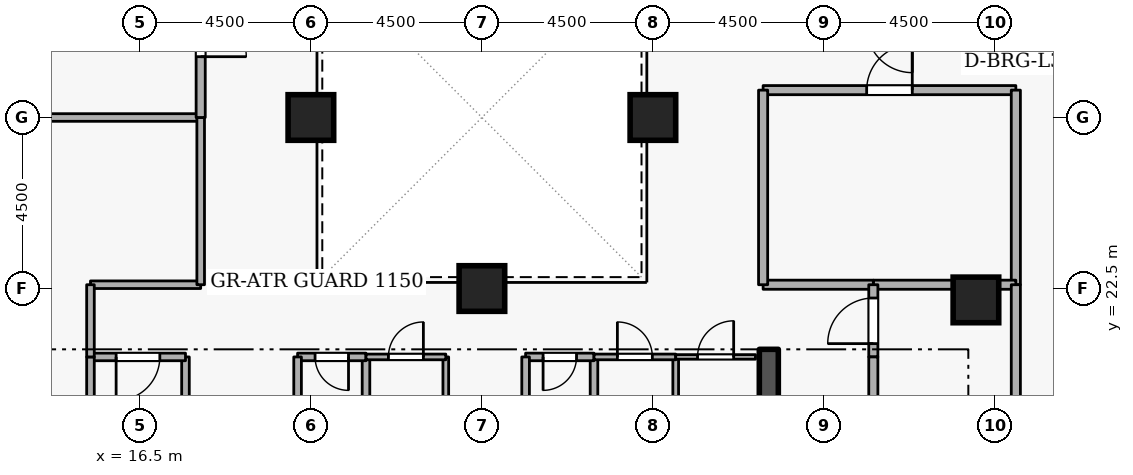
"""IFC4 building model, lengths in metres.
Left out: names, types, materials, properties, quantities, classifications, styles, units other than length and angle.
Written with IfcOpenShell. Run it as: python <this file> out.ifc"""

import sys

from ifc_helpers import new_model, si_unit, direction, frame, frame_2d, origin, origin_2d, place, context, subcontext, project, spatial, rectangle, extrude, element, fill, save


model = new_model("IFC4")
c1 = context("Model", 3, precision=1e-05, world=origin(), true_north=direction((0.0, 1.0)))
c2 = subcontext(c1, "Body", "Model", "MODEL_VIEW")
j1 = project(units=[si_unit("LENGTHUNIT", "METRE"), si_unit("PLANEANGLEUNIT", "RADIAN")], contexts=[c1])
p1 = place(None, origin())
s1 = spatial("IfcSite", under=j1, at=p1, CompositionType="ELEMENT")
p2 = place(p1, origin())
s2 = spatial("IfcBuilding", under=s1, at=p2, CompositionType="ELEMENT")
p3 = place(p2, frame((0.0, 0.0, 141.3)))
s3 = spatial("IfcBuildingStorey", under=s2, at=p3, CompositionType="ELEMENT", Elevation=141.3)
p4 = place(p3, frame((33.05, 15.1, 0.0), z_axis=(0.0, 0.0, 1.0), x_axis=(0.0, 1.0, 0.0)))
e1 = element("IfcWall", 1, at=p4, inside=s3, PredefinedType="SHEAR", context=c2, shape_type="SweptSolid", body=[
    extrude(rectangle(XDim=5.8, YDim=0.5, at=frame_2d((2.9, 0.0))), origin(), (0.0, 0.0, 1.0), 4.2),
])
for number, where, z_axis, x_axis in (
    (2, (38.5, 22.2, 0.0), (0.0, 0.0, 1.0), (1.0, 0.0, 0.0)),
    (3, (25.5, 22.5, 0.0), (0.0, 0.0, 1.0), (1.0, 0.0, 0.0)),
    (4, (21.0, 27.0, 0.0), (0.0, 0.0, 1.0), (1.0, 0.0, 0.0)),
    (5, (30.0, 27.0, 0.0), (0.0, 0.0, 1.0), (1.0, 0.0, 0.0)),
):
    element("IfcColumn", number, at=place(p3, frame(where, z_axis=z_axis, x_axis=x_axis)), inside=s3, PredefinedType="COLUMN", context=c2, shape_type="SweptSolid", body=[
        extrude(rectangle(XDim=1.2, YDim=1.2, at=origin_2d()), origin(), (0.0, 0.0, 1.0), 4.2),
    ])
p5 = place(p3, frame((17.7, 18.4, 0.0), z_axis=(0.0, 0.0, 1.0), x_axis=(0.0, 1.0, 0.0)))
e6 = element("IfcWall", 6, at=p5, inside=s3, PredefinedType="STANDARD", context=c2, shape_type="SweptSolid", body=[
    extrude(rectangle(XDim=2.3, YDim=0.2, at=frame_2d((1.15, 0.0))), origin(), (0.0, 0.0, 1.0), 3.145),
])
p6 = place(p3, frame((17.7, 20.7, 0.0), z_axis=(0.0, 0.0, 1.0), x_axis=(-1.0, 0.0, 0.0)))
e7 = element("IfcWall", 7, at=p6, inside=s3, PredefinedType="STANDARD", context=c2, shape_type="SweptSolid", body=[
    extrude(rectangle(XDim=2.5, YDim=0.2, at=frame_2d((1.25, 0.0))), origin(), (0.0, 0.0, 1.0), 3.94),
])
p7 = place(p6, frame((0.675, 0.0, 0.0)))
e8 = element("IfcOpeningElement", 8, at=p7, cuts=e7, PredefinedType="OPENING", context=c2, shape_type="SweptSolid", body=[
    extrude(rectangle(XDim=1.15, YDim=2.1, at=frame_2d((0.575, 1.05))), frame((0.0, 0.11, 0.0), z_axis=(0.0, -1.0, 0.0), x_axis=(1.0, 0.0, 0.0)), (0.0, 0.0, 1.0), 0.22),
])
p8 = place(p3, frame((15.2, 20.7, 0.0), z_axis=(0.0, 0.0, 1.0), x_axis=(0.0, -1.0, 0.0)))
e9 = element("IfcWall", 9, at=p8, inside=s3, PredefinedType="STANDARD", context=c2, shape_type="SweptSolid", body=[
    extrude(rectangle(XDim=5.7, YDim=0.2, at=frame_2d((2.85, 0.0))), origin(), (0.0, 0.0, 1.0), 3.94),
])
p9 = place(p8, frame((2.275, 0.0, 0.0)))
e10 = element("IfcOpeningElement", 10, at=p9, cuts=e9, PredefinedType="OPENING", context=c2, shape_type="SweptSolid", body=[
    extrude(rectangle(XDim=1.15, YDim=2.1, at=frame_2d((0.575, 1.05))), frame((0.0, 0.11, 0.0), z_axis=(0.0, -1.0, 0.0), x_axis=(1.0, 0.0, 0.0)), (0.0, 0.0, 1.0), 0.22),
])
p10 = place(p3, frame((28.45, 18.65, 0.0), z_axis=(0.0, 0.0, 1.0), x_axis=(0.0, 1.0, 0.0)))
e11 = element("IfcWall", 11, at=p10, inside=s3, PredefinedType="STANDARD", context=c2, shape_type="SweptSolid", body=[
    extrude(rectangle(XDim=2.05, YDim=0.2, at=frame_2d((1.025, 0.0))), origin(), (0.0, 0.0, 1.0), 3.94),
])
p11 = place(p3, frame((28.45, 20.7, 0.0), z_axis=(0.0, 0.0, 1.0), x_axis=(-1.0, 0.0, 0.0)))
e12 = element("IfcWall", 12, at=p11, inside=s3, PredefinedType="STANDARD", context=c2, shape_type="SweptSolid", body=[
    extrude(rectangle(XDim=1.8, YDim=0.2, at=frame_2d((0.9, 0.0))), origin(), (0.0, 0.0, 1.0), 3.94),
])
p12 = place(p11, frame((0.46, 0.0, 0.0)))
e13 = element("IfcOpeningElement", 13, at=p12, cuts=e12, PredefinedType="OPENING", context=c2, shape_type="SweptSolid", body=[
    extrude(rectangle(XDim=0.88, YDim=2.04, at=frame_2d((0.44, 1.02))), frame((0.0, 0.11, 0.0), z_axis=(0.0, -1.0, 0.0), x_axis=(1.0, 0.0, 0.0)), (0.0, 0.0, 1.0), 0.22),
])
for number, where, z_axis, x_axis in (
    (14, (26.65, 20.7, 0.0), (0.0, 0.0, 1.0), (0.0, -1.0, 0.0)),
    (15, (22.45, 18.65, 0.0), (0.0, 0.0, 1.0), (0.0, 1.0, 0.0)),
):
    element("IfcWall", number, at=place(p3, frame(where, z_axis=z_axis, x_axis=x_axis)), inside=s3, PredefinedType="STANDARD", context=c2, shape_type="SweptSolid", body=[
        extrude(rectangle(XDim=2.05, YDim=0.2, at=frame_2d((1.025, 0.0))), origin(), (0.0, 0.0, 1.0), 3.94),
    ])
p13 = place(p3, frame((22.45, 20.7, 0.0), z_axis=(0.0, 0.0, 1.0), x_axis=(-1.0, 0.0, 0.0)))
e16 = element("IfcWall", 16, at=p13, inside=s3, PredefinedType="STANDARD", context=c2, shape_type="SweptSolid", body=[
    extrude(rectangle(XDim=1.8, YDim=0.2, at=frame_2d((0.9, 0.0))), origin(), (0.0, 0.0, 1.0), 3.94),
])
p14 = place(p13, frame((0.46, 0.0, 0.0)))
e17 = element("IfcOpeningElement", 17, at=p14, cuts=e16, PredefinedType="OPENING", context=c2, shape_type="SweptSolid", body=[
    extrude(rectangle(XDim=0.88, YDim=2.04, at=frame_2d((0.44, 1.02))), frame((0.0, 0.11, 0.0), z_axis=(0.0, -1.0, 0.0), x_axis=(1.0, 0.0, 0.0)), (0.0, 0.0, 1.0), 0.22),
])
p15 = place(p3, frame((20.65, 20.7, 0.0), z_axis=(0.0, 0.0, 1.0), x_axis=(0.0, -1.0, 0.0)))
e18 = element("IfcWall", 18, at=p15, inside=s3, PredefinedType="STANDARD", context=c2, shape_type="SweptSolid", body=[
    extrude(rectangle(XDim=2.05, YDim=0.2, at=frame_2d((1.025, 0.0))), origin(), (0.0, 0.0, 1.0), 3.94),
])
p16 = place(p3, frame((32.9, 27.72, 0.0), z_axis=(0.0, 0.0, 1.0), x_axis=(1.0, 0.0, 0.0)))
e19 = element("IfcWall", 19, at=p16, inside=s3, PredefinedType="STANDARD", context=c2, shape_type="SweptSolid", body=[
    extrude(rectangle(XDim=6.65, YDim=0.24, at=frame_2d((3.325, 0.0))), origin(), (0.0, 0.0, 1.0), 3.94),
])
p17 = place(p16, frame((2.725, 0.0, 0.0)))
e20 = element("IfcOpeningElement", 20, at=p17, cuts=e19, PredefinedType="OPENING", context=c2, shape_type="SweptSolid", body=[
    extrude(rectangle(XDim=1.2, YDim=2.1, at=frame_2d((0.6, 1.05))), frame((0.0, 0.13, 0.0), z_axis=(0.0, -1.0, 0.0), x_axis=(1.0, 0.0, 0.0)), (0.0, 0.0, 1.0), 0.26),
])
p18 = place(p3, frame((39.55, 27.72, 0.0), z_axis=(0.0, 0.0, 1.0), x_axis=(0.0, -1.0, 0.0)))
e21 = element("IfcWall", 21, at=p18, inside=s3, PredefinedType="STANDARD", context=c2, shape_type="SweptSolid", body=[
    extrude(rectangle(XDim=5.12, YDim=0.24, at=frame_2d((2.56, 0.0))), origin(), (0.0, 0.0, 1.0), 3.94),
])
p19 = place(p3, frame((39.55, 22.6, 0.0), z_axis=(0.0, 0.0, 1.0), x_axis=(-1.0, 0.0, 0.0)))
e22 = element("IfcWall", 22, at=p19, inside=s3, PredefinedType="STANDARD", context=c2, shape_type="SweptSolid", body=[
    extrude(rectangle(XDim=3.75, YDim=0.24, at=frame_2d((1.875, 0.0))), origin(), (0.0, 0.0, 1.0), 3.94),
])
p20 = place(p3, frame((35.8, 22.6, 0.0), z_axis=(0.0, 0.0, 1.0), x_axis=(-1.0, 0.0, 0.0)))
e23 = element("IfcWall", 23, at=p20, inside=s3, PredefinedType="STANDARD", context=c2, shape_type="SweptSolid", body=[
    extrude(rectangle(XDim=2.9, YDim=0.24, at=frame_2d((1.45, 0.0))), origin(), (0.0, 0.0, 1.0), 3.94),
])
p21 = place(p3, frame((32.9, 22.6, 0.0), z_axis=(0.0, 0.0, 1.0), x_axis=(0.0, 1.0, 0.0)))
e24 = element("IfcWall", 24, at=p21, inside=s3, PredefinedType="STANDARD", context=c2, shape_type="SweptSolid", body=[
    extrude(rectangle(XDim=5.12, YDim=0.24, at=frame_2d((2.56, 0.0))), origin(), (0.0, 0.0, 1.0), 3.145),
])
p22 = place(p3, frame((18.1, 22.6, 0.0), z_axis=(0.0, 0.0, 1.0), x_axis=(-1.0, 0.0, 0.0)))
e25 = element("IfcWall", 25, at=p22, inside=s3, PredefinedType="STANDARD", context=c2, shape_type="SweptSolid", body=[
    extrude(rectangle(XDim=2.9, YDim=0.2, at=frame_2d((1.45, 0.0))), origin(), (0.0, 0.0, 1.0), 3.94),
])
p23 = place(p3, frame((15.2, 22.6, 0.0), z_axis=(0.0, 0.0, 1.0), x_axis=(0.0, -1.0, 0.0)))
e26 = element("IfcWall", 26, at=p23, inside=s3, PredefinedType="STANDARD", context=c2, shape_type="SweptSolid", body=[
    extrude(rectangle(XDim=1.9, YDim=0.2, at=frame_2d((0.95, 0.0))), origin(), (0.0, 0.0, 1.0), 3.94),
])
p24 = place(p3, frame((5.45, 27.0, 0.0), z_axis=(0.0, 0.0, 1.0), x_axis=(1.0, 0.0, 0.0)))
e27 = element("IfcWall", 27, at=p24, inside=s3, PredefinedType="STANDARD", context=c2, shape_type="SweptSolid", body=[
    extrude(rectangle(XDim=12.65, YDim=0.2, at=frame_2d((6.325, 0.0))), origin(), (0.0, 0.0, 1.0), 3.325),
])
p25 = place(p3, frame((18.1, 27.0, 0.0), z_axis=(0.0, 0.0, 1.0), x_axis=(0.0, -1.0, 0.0)))
e28 = element("IfcWall", 28, at=p25, inside=s3, PredefinedType="STANDARD", context=c2, shape_type="SweptSolid", body=[
    extrude(rectangle(XDim=4.4, YDim=0.2, at=frame_2d((2.2, 0.0))), origin(), (0.0, 0.0, 1.0), 3.145),
])
p26 = place(p3, frame((18.1, 31.4, 0.0), z_axis=(0.0, 0.0, 1.0), x_axis=(0.0, -1.0, 0.0)))
e29 = element("IfcWall", 29, at=p26, inside=s3, PredefinedType="STANDARD", context=c2, shape_type="SweptSolid", body=[
    extrude(rectangle(XDim=4.4, YDim=0.24, at=frame_2d((2.2, 0.0))), origin(), (0.0, 0.0, 1.0), 3.145),
])
p27 = place(p26, frame((1.6, 0.0, 0.0)))
e30 = element("IfcOpeningElement", 30, at=p27, cuts=e29, PredefinedType="OPENING", context=c2, shape_type="SweptSolid", body=[
    extrude(rectangle(XDim=1.2, YDim=2.1, at=frame_2d((0.6, 1.05))), frame((0.0, 0.13, 0.0), z_axis=(0.0, -1.0, 0.0), x_axis=(1.0, 0.0, 0.0)), (0.0, 0.0, 1.0), 0.26),
])
p28 = place(p3, frame((35.8, 20.7, 0.0), z_axis=(0.0, 0.0, 1.0), x_axis=(0.0, 1.0, 0.0)))
e31 = element("IfcWall", 31, at=p28, inside=s3, PredefinedType="STANDARD", context=c2, shape_type="SweptSolid", body=[
    extrude(rectangle(XDim=1.9, YDim=0.24, at=frame_2d((0.95, 0.0))), origin(), (0.0, 0.0, 1.0), 3.94),
])
p29 = place(p28, frame((0.35, 0.0, 0.0)))
e32 = element("IfcOpeningElement", 32, at=p29, cuts=e31, PredefinedType="OPENING", context=c2, shape_type="SweptSolid", body=[
    extrude(rectangle(XDim=1.2, YDim=2.1, at=frame_2d((0.6, 1.05))), frame((0.0, 0.13, 0.0), z_axis=(0.0, -1.0, 0.0), x_axis=(1.0, 0.0, 0.0)), (0.0, 0.0, 1.0), 0.26),
])
p30 = place(p3, frame((39.55, 22.6, 0.0), z_axis=(0.0, 0.0, 1.0), x_axis=(0.0, -1.0, 0.0)))
e33 = element("IfcWall", 33, at=p30, inside=s3, PredefinedType="STANDARD", context=c2, shape_type="SweptSolid", body=[
    extrude(rectangle(XDim=7.4, YDim=0.24, at=frame_2d((3.7, 0.0))), origin(), (0.0, 0.0, 1.0), 3.94),
])
p31 = place(p3, frame((35.8, 15.2, 0.0), z_axis=(0.0, 0.0, 1.0), x_axis=(0.0, 1.0, 0.0)))
e34 = element("IfcWall", 34, at=p31, inside=s3, PredefinedType="STANDARD", context=c2, shape_type="SweptSolid", body=[
    extrude(rectangle(XDim=5.5, YDim=0.24, at=frame_2d((2.75, 0.0))), origin(), (0.0, 0.0, 1.0), 3.94),
])
p32 = place(p3, frame((24.55, 20.7, 0.0), z_axis=(0.0, 0.0, 1.0), x_axis=(0.0, -1.0, 0.0)))
e35 = element("IfcWall", 35, at=p32, inside=s3, PredefinedType="PARTITIONING", context=c2, shape_type="SweptSolid", body=[
    extrude(rectangle(XDim=2.05, YDim=0.15, at=frame_2d((1.025, 0.0))), origin(), (0.0, 0.0, 1.0), 3.94),
])
p33 = place(p3, frame((22.45, 20.7, 0.0), z_axis=(0.0, 0.0, 1.0), x_axis=(1.0, 0.0, 0.0)))
e36 = element("IfcWall", 36, at=p33, inside=s3, PredefinedType="PARTITIONING", context=c2, shape_type="SweptSolid", body=[
    extrude(rectangle(XDim=2.1, YDim=0.15, at=frame_2d((1.05, 0.0))), origin(), (0.0, 0.0, 1.0), 3.94),
])
p34 = place(p33, frame((0.59, 0.0, 0.0)))
e37 = element("IfcOpeningElement", 37, at=p34, cuts=e36, PredefinedType="OPENING", context=c2, shape_type="SweptSolid", body=[
    extrude(rectangle(XDim=0.92, YDim=2.08, at=frame_2d((0.46, 1.04))), frame((0.0, 0.085, 0.0), z_axis=(0.0, -1.0, 0.0), x_axis=(1.0, 0.0, 0.0)), (0.0, 0.0, 1.0), 0.17),
])
p35 = place(p3, frame((30.6, 20.7, 0.0), z_axis=(0.0, 0.0, 1.0), x_axis=(0.0, -1.0, 0.0)))
e38 = element("IfcWall", 38, at=p35, inside=s3, PredefinedType="PARTITIONING", context=c2, shape_type="SweptSolid", body=[
    extrude(rectangle(XDim=2.05, YDim=0.15, at=frame_2d((1.025, 0.0))), origin(), (0.0, 0.0, 1.0), 3.94),
])
p36 = place(p3, frame((28.45, 20.7, 0.0), z_axis=(0.0, 0.0, 1.0), x_axis=(1.0, 0.0, 0.0)))
e39 = element("IfcWall", 39, at=p36, inside=s3, PredefinedType="PARTITIONING", context=c2, shape_type="SweptSolid", body=[
    extrude(rectangle(XDim=2.15, YDim=0.15, at=frame_2d((1.075, 0.0))), origin(), (0.0, 0.0, 1.0), 3.94),
])
p37 = place(p36, frame((0.615, 0.0, 0.0)))
e40 = element("IfcOpeningElement", 40, at=p37, cuts=e39, PredefinedType="OPENING", context=c2, shape_type="SweptSolid", body=[
    extrude(rectangle(XDim=0.92, YDim=2.08, at=frame_2d((0.46, 1.04))), frame((0.0, 0.085, 0.0), z_axis=(0.0, -1.0, 0.0), x_axis=(1.0, 0.0, 0.0)), (0.0, 0.0, 1.0), 0.17),
])
p38 = place(p3, frame((30.6, 20.7, 0.0), z_axis=(0.0, 0.0, 1.0), x_axis=(1.0, 0.0, 0.0)))
e41 = element("IfcWall", 41, at=p38, inside=s3, PredefinedType="PARTITIONING", context=c2, shape_type="SweptSolid", body=[
    extrude(rectangle(XDim=2.1, YDim=0.12, at=frame_2d((1.05, 0.0))), origin(), (0.0, 0.0, 1.0), 3.94),
])
p39 = place(p38, frame((0.575, 0.0, 0.0)))
e42 = element("IfcOpeningElement", 42, at=p39, cuts=e41, PredefinedType="OPENING", context=c2, shape_type="SweptSolid", body=[
    extrude(rectangle(XDim=0.95, YDim=2.1, at=frame_2d((0.475, 1.05))), frame((0.0, 0.07, 0.0), z_axis=(0.0, -1.0, 0.0), x_axis=(1.0, 0.0, 0.0)), (0.0, 0.0, 1.0), 0.14),
])
p40 = place(p7, origin())
e43 = element("IfcDoor", 43, at=p40, inside=s3, OperationType="SINGLE_SWING_RIGHT", PredefinedType="DOOR", context=c2, shape_type="SweptSolid", body=[
    extrude(rectangle(XDim=1.15, YDim=2.1, at=frame_2d((0.575, 1.05))), frame((0.0, 0.025, 0.0), z_axis=(0.0, -1.0, 0.0), x_axis=(1.0, 0.0, 0.0)), (0.0, 0.0, 1.0), 0.05),
])
fill(e8, e43)
p41 = place(p12, origin())
e44 = element("IfcDoor", 44, at=p41, inside=s3, OperationType="SINGLE_SWING_RIGHT", PredefinedType="DOOR", context=c2, shape_type="SweptSolid", body=[
    extrude(rectangle(XDim=0.88, YDim=2.04, at=frame_2d((0.44, 1.02))), frame((0.0, 0.025, 0.0), z_axis=(0.0, -1.0, 0.0), x_axis=(1.0, 0.0, 0.0)), (0.0, 0.0, 1.0), 0.05),
])
fill(e13, e44)
p42 = place(p14, origin())
e45 = element("IfcDoor", 45, at=p42, inside=s3, OperationType="SINGLE_SWING_LEFT", PredefinedType="DOOR", context=c2, shape_type="SweptSolid", body=[
    extrude(rectangle(XDim=0.88, YDim=2.04, at=frame_2d((0.44, 1.02))), frame((0.0, 0.025, 0.0), z_axis=(0.0, -1.0, 0.0), x_axis=(1.0, 0.0, 0.0)), (0.0, 0.0, 1.0), 0.05),
])
fill(e17, e45)
p43 = place(p34, origin())
e46 = element("IfcDoor", 46, at=p43, inside=s3, OperationType="SINGLE_SWING_RIGHT", PredefinedType="DOOR", context=c2, shape_type="SweptSolid", body=[
    extrude(rectangle(XDim=0.92, YDim=2.08, at=frame_2d((0.46, 1.04))), frame((0.0, 0.025, 0.0), z_axis=(0.0, -1.0, 0.0), x_axis=(1.0, 0.0, 0.0)), (0.0, 0.0, 1.0), 0.05),
])
fill(e37, e46)
p44 = place(p37, origin())
e47 = element("IfcDoor", 47, at=p44, inside=s3, OperationType="SINGLE_SWING_LEFT", PredefinedType="DOOR", context=c2, shape_type="SweptSolid", body=[
    extrude(rectangle(XDim=0.92, YDim=2.08, at=frame_2d((0.46, 1.04))), frame((0.0, 0.025, 0.0), z_axis=(0.0, -1.0, 0.0), x_axis=(1.0, 0.0, 0.0)), (0.0, 0.0, 1.0), 0.05),
])
fill(e40, e47)
p45 = place(p39, origin())
e48 = element("IfcDoor", 48, at=p45, inside=s3, OperationType="SINGLE_SWING_RIGHT", PredefinedType="DOOR", context=c2, shape_type="SweptSolid", body=[
    extrude(rectangle(XDim=0.95, YDim=2.1, at=frame_2d((0.475, 1.05))), frame((0.0, 0.025, 0.0), z_axis=(0.0, -1.0, 0.0), x_axis=(1.0, 0.0, 0.0)), (0.0, 0.0, 1.0), 0.05),
])
fill(e42, e48)
p46 = place(p17, origin())
e49 = element("IfcDoor", 49, at=p46, inside=s3, OperationType="SINGLE_SWING_RIGHT", PredefinedType="DOOR", context=c2, shape_type="SweptSolid", body=[
    extrude(rectangle(XDim=1.2, YDim=2.1, at=frame_2d((0.6, 1.05))), frame((0.0, 0.025, 0.0), z_axis=(0.0, -1.0, 0.0), x_axis=(1.0, 0.0, 0.0)), (0.0, 0.0, 1.0), 0.05),
])
fill(e20, e49)
p47 = place(p27, origin())
e50 = element("IfcDoor", 50, at=p47, inside=s3, OperationType="SINGLE_SWING_RIGHT", PredefinedType="DOOR", context=c2, shape_type="SweptSolid", body=[
    extrude(rectangle(XDim=1.2, YDim=2.1, at=frame_2d((0.6, 1.05))), frame((0.0, 0.025, 0.0), z_axis=(0.0, -1.0, 0.0), x_axis=(1.0, 0.0, 0.0)), (0.0, 0.0, 1.0), 0.05),
])
fill(e30, e50)
p48 = place(p29, origin())
e51 = element("IfcDoor", 51, at=p48, inside=s3, OperationType="SINGLE_SWING_LEFT", PredefinedType="DOOR", context=c2, shape_type="SweptSolid", body=[
    extrude(rectangle(XDim=1.2, YDim=2.1, at=frame_2d((0.6, 1.05))), frame((0.0, 0.025, 0.0), z_axis=(0.0, -1.0, 0.0), x_axis=(1.0, 0.0, 0.0)), (0.0, 0.0, 1.0), 0.05),
])
fill(e32, e51)
save(model, sys.argv[1])
